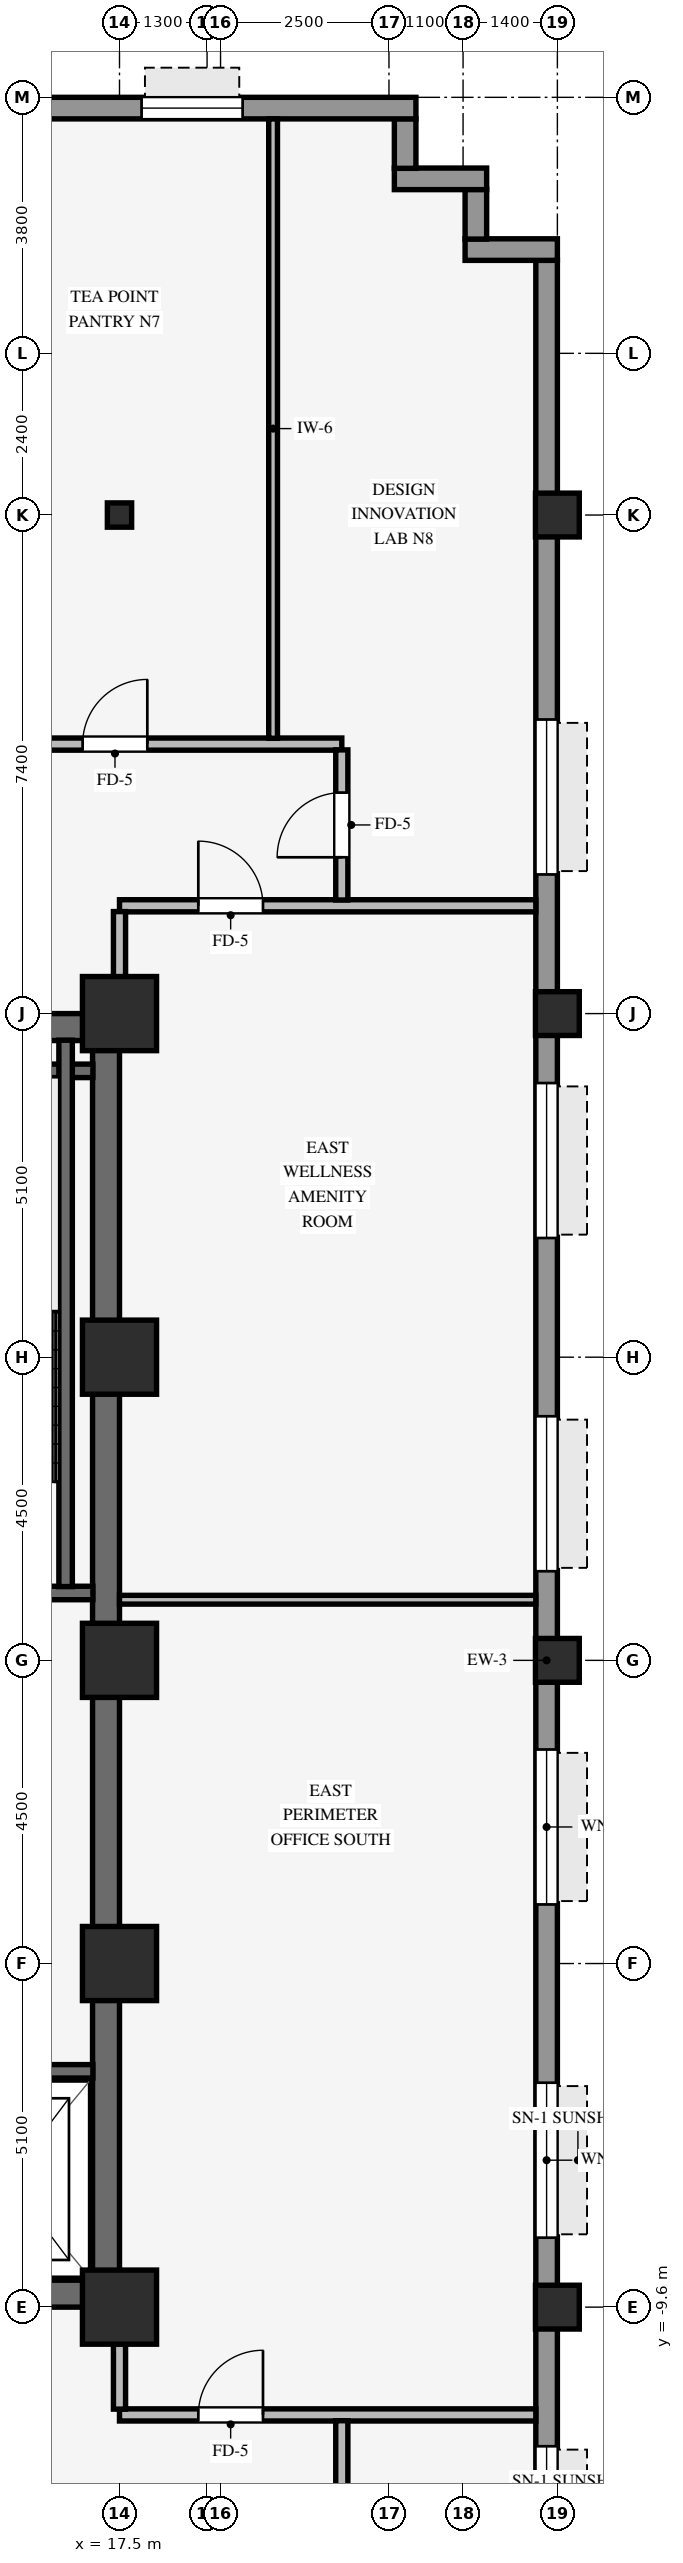
"""IFC4 building model, lengths in metres.
Left out: names, types, materials, properties, quantities, classifications, styles, units other than length and angle.
Written with IfcOpenShell. Run it as: python <this file> out.ifc"""

import sys

from ifc_helpers import new_model, si_unit, direction, frame, frame_2d, origin, origin_2d, place, context, subcontext, project, spatial, rectangle, hollow_rectangle, i_section, extrude, source, transform, mapped, element, fill, save


model = new_model("IFC4")
c1 = context("Model", 3, precision=1e-05, world=origin(), true_north=direction((0.0, 1.0)))
c2 = subcontext(c1, "Body", "Model", "MODEL_VIEW")
j1 = project(units=[si_unit("LENGTHUNIT", "METRE"), si_unit("PLANEANGLEUNIT", "RADIAN")], contexts=[c1])
p1 = place(None, origin())
s1 = spatial("IfcSite", under=j1, at=p1, CompositionType="ELEMENT")
p2 = place(p1, origin())
s2 = spatial("IfcBuilding", under=s1, at=p2, CompositionType="ELEMENT")
p3 = place(p2, frame((0.0, 0.0, 109.25)))
s3 = spatial("IfcBuildingStorey", under=s2, at=p3, CompositionType="ELEMENT", Elevation=109.25)
for number, where, z_axis, x_axis in (
    (1, (9.0, -9.4, 0.0), (0.0, 0.0, 1.0), (1.0, 0.0, 0.0)),
    (2, (9.0, 9.4, 0.0), (0.0, 0.0, 1.0), (1.0, 0.0, 0.0)),
):
    element("IfcWall", number, at=place(p3, frame(where, z_axis=z_axis, x_axis=x_axis)), inside=s3, PredefinedType="SHEAR", context=c2, shape_type="SweptSolid", body=[
        extrude(rectangle(XDim=8.5, YDim=0.4, at=frame_2d((4.25, 0.0))), origin(), (0.0, 0.0, 1.0), 3.37),
    ])
p4 = place(p3, frame((17.3, -9.205, 0.0), z_axis=(0.0, 0.0, 1.0), x_axis=(0.0, 1.0, 0.0)))
e3 = element("IfcWall", 3, at=p4, inside=s3, PredefinedType="SHEAR", context=c2, shape_type="SweptSolid", body=[
    extrude(rectangle(XDim=18.41, YDim=0.4, at=frame_2d((9.205, 0.0))), origin(), (0.0, 0.0, 1.0), 3.37),
])
for number, where, z_axis, x_axis in (
    (4, (17.5, -9.6, 0.0), (0.0, 0.0, 1.0), (1.0, 0.0, 0.0)),
    (5, (17.5, -4.5, 0.0), (0.0, 0.0, 1.0), (1.0, 0.0, 0.0)),
    (6, (17.5, 4.5, 0.0), (0.0, 0.0, 1.0), (1.0, 0.0, 0.0)),
    (7, (17.5, 9.6, 0.0), (0.0, 0.0, 1.0), (1.0, 0.0, 0.0)),
    (8, (17.5, 0.0, 0.0), (0.0, 0.0, 1.0), (1.0, 0.0, 0.0)),
):
    element("IfcColumn", number, at=place(p3, frame(where, z_axis=z_axis, x_axis=x_axis)), inside=s3, PredefinedType="COLUMN", context=c2, shape_type="SweptSolid", body=[
        extrude(rectangle(XDim=1.1, YDim=1.1, at=origin_2d()), origin(), (0.0, 0.0, 1.0), 3.37),
    ])
for number, where, z_axis, x_axis in (
    (9, (24.0, -9.6, 0.0), (0.0, 0.0, 1.0), (1.0, 0.0, 0.0)),
    (10, (24.0, 0.0, 0.0), (0.0, 0.0, 1.0), (1.0, 0.0, 0.0)),
    (11, (24.0, 9.6, 0.0), (0.0, 0.0, 1.0), (1.0, 0.0, 0.0)),
    (12, (24.0, 17.0, 0.0), (0.0, 0.0, 1.0), (1.0, 0.0, 0.0)),
):
    element("IfcColumn", number, at=place(p3, frame(where, z_axis=z_axis, x_axis=x_axis)), inside=s3, PredefinedType="COLUMN", context=c2, shape_type="SweptSolid", body=[
        extrude(hollow_rectangle(XDim=0.65, YDim=0.65, WallThickness=0.04, InnerFilletRadius=0.04, OuterFilletRadius=0.08, at=origin_2d()), origin(), (0.0, 0.0, 1.0), 3.37),
    ])
p5 = place(p3, frame((17.5, 17.0, 0.0), z_axis=(0.0, 0.0, 1.0), x_axis=(1.0, 0.0, 0.0)))
e13 = element("IfcColumn", 13, at=p5, inside=s3, PredefinedType="COLUMN", context=c2, shape_type="SweptSolid", body=[
    extrude(i_section(OverallWidth=0.36, OverallDepth=0.36, WebThickness=0.021, FlangeThickness=0.021, FilletRadius=0.018, at=origin_2d()), origin(), (0.0, 0.0, 1.0), 3.37),
])
p6 = place(p3, frame((23.84, -20.784, 0.0), z_axis=(0.0, 0.0, 1.0), x_axis=(0.0, 1.0, 0.0)))
e14 = element("IfcWall", 14, at=p6, inside=s3, PredefinedType="STANDARD", context=c2, shape_type="SweptSolid", body=[
    extrude(rectangle(XDim=41.568, YDim=0.32, at=frame_2d((20.784, 0.0))), origin(), (0.0, 0.0, 1.0), 2.705),
])
p7 = place(p6, frame((6.819, 0.0, 0.8)))
e15 = element("IfcOpeningElement", 15, at=p7, cuts=e14, PredefinedType="OPENING", context=c2, shape_type="SweptSolid", body=[
    extrude(rectangle(XDim=2.3, YDim=1.62, at=frame_2d((1.15, 0.81))), frame((0.0, 0.17, 0.0), z_axis=(0.0, -1.0, 0.0), x_axis=(1.0, 0.0, 0.0)), (0.0, 0.0, 1.0), 0.34),
])
p8 = place(p6, frame((12.215, 0.0, 0.8)))
e16 = element("IfcOpeningElement", 16, at=p8, cuts=e14, PredefinedType="OPENING", context=c2, shape_type="SweptSolid", body=[
    extrude(rectangle(XDim=2.3, YDim=1.62, at=frame_2d((1.15, 0.81))), frame((0.0, 0.17, 0.0), z_axis=(0.0, -1.0, 0.0), x_axis=(1.0, 0.0, 0.0)), (0.0, 0.0, 1.0), 0.34),
])
p9 = place(p6, frame((17.161, 0.0, 0.8)))
e17 = element("IfcOpeningElement", 17, at=p9, cuts=e14, PredefinedType="OPENING", context=c2, shape_type="SweptSolid", body=[
    extrude(rectangle(XDim=2.3, YDim=1.62, at=frame_2d((1.15, 0.81))), frame((0.0, 0.17, 0.0), z_axis=(0.0, -1.0, 0.0), x_axis=(1.0, 0.0, 0.0)), (0.0, 0.0, 1.0), 0.34),
])
p10 = place(p6, frame((22.107, 0.0, 0.8)))
e18 = element("IfcOpeningElement", 18, at=p10, cuts=e14, PredefinedType="OPENING", context=c2, shape_type="SweptSolid", body=[
    extrude(rectangle(XDim=2.3, YDim=1.62, at=frame_2d((1.15, 0.81))), frame((0.0, 0.17, 0.0), z_axis=(0.0, -1.0, 0.0), x_axis=(1.0, 0.0, 0.0)), (0.0, 0.0, 1.0), 0.34),
])
p11 = place(p6, frame((27.053, 0.0, 0.8)))
e19 = element("IfcOpeningElement", 19, at=p11, cuts=e14, PredefinedType="OPENING", context=c2, shape_type="SweptSolid", body=[
    extrude(rectangle(XDim=2.3, YDim=1.62, at=frame_2d((1.15, 0.81))), frame((0.0, 0.17, 0.0), z_axis=(0.0, -1.0, 0.0), x_axis=(1.0, 0.0, 0.0)), (0.0, 0.0, 1.0), 0.34),
])
p12 = place(p6, frame((32.449, 0.0, 0.8)))
e20 = element("IfcOpeningElement", 20, at=p12, cuts=e14, PredefinedType="OPENING", context=c2, shape_type="SweptSolid", body=[
    extrude(rectangle(XDim=2.3, YDim=1.62, at=frame_2d((1.15, 0.81))), frame((0.0, 0.17, 0.0), z_axis=(0.0, -1.0, 0.0), x_axis=(1.0, 0.0, 0.0)), (0.0, 0.0, 1.0), 0.34),
])
p13 = place(p3, frame((22.63, 20.94, 0.0), z_axis=(0.0, 0.0, 1.0), x_axis=(1.0, 0.0, 0.0)))
e21 = element("IfcWall", 21, at=p13, inside=s3, PredefinedType="STANDARD", context=c2, shape_type="SweptSolid", body=[
    extrude(rectangle(XDim=1.37, YDim=0.32, at=frame_2d((0.685, 0.0))), origin(), (0.0, 0.0, 1.0), 3.36),
])
p14 = place(p3, frame((22.79, 21.096, 0.0), z_axis=(0.0, 0.0, 1.0), x_axis=(0.0, 1.0, 0.0)))
e22 = element("IfcWall", 22, at=p14, inside=s3, PredefinedType="STANDARD", context=c2, shape_type="SweptSolid", body=[
    extrude(rectangle(XDim=0.738, YDim=0.32, at=frame_2d((0.369, 0.0))), origin(), (0.0, 0.0, 1.0), 3.36),
])
p15 = place(p3, frame((21.58, 21.99, 0.0), z_axis=(0.0, 0.0, 1.0), x_axis=(1.0, 0.0, 0.0)))
e23 = element("IfcWall", 23, at=p15, inside=s3, PredefinedType="STANDARD", context=c2, shape_type="SweptSolid", body=[
    extrude(rectangle(XDim=1.37, YDim=0.32, at=frame_2d((0.685, 0.0))), origin(), (0.0, 0.0, 1.0), 3.36),
])
p16 = place(p3, frame((21.74, 22.146, 0.0), z_axis=(0.0, 0.0, 1.0), x_axis=(0.0, 1.0, 0.0)))
e24 = element("IfcWall", 24, at=p16, inside=s3, PredefinedType="STANDARD", context=c2, shape_type="SweptSolid", body=[
    extrude(rectangle(XDim=0.738, YDim=0.32, at=frame_2d((0.369, 0.0))), origin(), (0.0, 0.0, 1.0), 3.36),
])
p17 = place(p3, frame((-21.9, 23.04, 0.0), z_axis=(0.0, 0.0, 1.0), x_axis=(1.0, 0.0, 0.0)))
e25 = element("IfcWall", 25, at=p17, inside=s3, PredefinedType="STANDARD", context=c2, shape_type="SweptSolid", body=[
    extrude(rectangle(XDim=43.8, YDim=0.32, at=frame_2d((21.9, 0.0))), origin(), (0.0, 0.0, 1.0), 2.705),
])
p18 = place(p17, frame((2.572, 0.0, 0.8)))
e26 = element("IfcOpeningElement", 26, at=p18, cuts=e25, PredefinedType="OPENING", context=c2, shape_type="SweptSolid", body=[
    extrude(rectangle(XDim=1.5, YDim=1.6, at=frame_2d((0.75, 0.8))), frame((0.0, 0.17, 0.0), z_axis=(0.0, -1.0, 0.0), x_axis=(1.0, 0.0, 0.0)), (0.0, 0.0, 1.0), 0.34),
])
p19 = place(p17, frame((6.317, 0.0, 0.8)))
e27 = element("IfcOpeningElement", 27, at=p19, cuts=e25, PredefinedType="OPENING", context=c2, shape_type="SweptSolid", body=[
    extrude(rectangle(XDim=1.5, YDim=1.6, at=frame_2d((0.75, 0.8))), frame((0.0, 0.17, 0.0), z_axis=(0.0, -1.0, 0.0), x_axis=(1.0, 0.0, 0.0)), (0.0, 0.0, 1.0), 0.34),
])
p20 = place(p17, frame((10.511, 0.0, 0.8)))
e28 = element("IfcOpeningElement", 28, at=p20, cuts=e25, PredefinedType="OPENING", context=c2, shape_type="SweptSolid", body=[
    extrude(rectangle(XDim=1.5, YDim=1.6, at=frame_2d((0.75, 0.8))), frame((0.0, 0.17, 0.0), z_axis=(0.0, -1.0, 0.0), x_axis=(1.0, 0.0, 0.0)), (0.0, 0.0, 1.0), 0.34),
])
p21 = place(p17, frame((16.956, 0.0, 0.8)))
e29 = element("IfcOpeningElement", 29, at=p21, cuts=e25, PredefinedType="OPENING", context=c2, shape_type="SweptSolid", body=[
    extrude(rectangle(XDim=1.5, YDim=1.6, at=frame_2d((0.75, 0.8))), frame((0.0, 0.17, 0.0), z_axis=(0.0, -1.0, 0.0), x_axis=(1.0, 0.0, 0.0)), (0.0, 0.0, 1.0), 0.34),
])
p22 = place(p17, frame((24.894, 0.0, 0.8)))
e30 = element("IfcOpeningElement", 30, at=p22, cuts=e25, PredefinedType="OPENING", context=c2, shape_type="SweptSolid", body=[
    extrude(rectangle(XDim=1.5, YDim=1.6, at=frame_2d((0.75, 0.8))), frame((0.0, 0.17, 0.0), z_axis=(0.0, -1.0, 0.0), x_axis=(1.0, 0.0, 0.0)), (0.0, 0.0, 1.0), 0.34),
])
p23 = place(p17, frame((35.083, 0.0, 0.8)))
e31 = element("IfcOpeningElement", 31, at=p23, cuts=e25, PredefinedType="OPENING", context=c2, shape_type="SweptSolid", body=[
    extrude(rectangle(XDim=1.5, YDim=1.6, at=frame_2d((0.75, 0.8))), frame((0.0, 0.17, 0.0), z_axis=(0.0, -1.0, 0.0), x_axis=(1.0, 0.0, 0.0)), (0.0, 0.0, 1.0), 0.34),
])
p24 = place(p17, frame((39.728, 0.0, 0.8)))
e32 = element("IfcOpeningElement", 32, at=p24, cuts=e25, PredefinedType="OPENING", context=c2, shape_type="SweptSolid", body=[
    extrude(rectangle(XDim=1.5, YDim=1.6, at=frame_2d((0.75, 0.8))), frame((0.0, 0.17, 0.0), z_axis=(0.0, -1.0, 0.0), x_axis=(1.0, 0.0, 0.0)), (0.0, 0.0, 1.0), 0.34),
])
for number, where, z_axis, x_axis in (
    (33, (13.535, 1.0, 0.0), (0.0, 0.0, 1.0), (1.0, 0.0, 0.0)),
    (34, (13.535, 8.75, 0.0), (0.0, 0.0, 1.0), (1.0, 0.0, 0.0)),
):
    element("IfcWall", number, at=place(p3, frame(where, z_axis=z_axis, x_axis=x_axis)), inside=s3, PredefinedType="SHEAR", context=c2, shape_type="SweptSolid", body=[
        extrude(rectangle(XDim=3.57, YDim=0.2, at=frame_2d((1.785, 0.0))), origin(), (0.0, 0.0, 1.0), 3.37),
    ])
p25 = place(p3, frame((16.7, 1.095, 0.0), z_axis=(0.0, 0.0, 1.0), x_axis=(0.0, 1.0, 0.0)))
e35 = element("IfcWall", 35, at=p25, inside=s3, PredefinedType="SHEAR", context=c2, shape_type="SweptSolid", body=[
    extrude(rectangle(XDim=8.11, YDim=0.2, at=frame_2d((4.055, 0.0))), origin(), (0.0, 0.0, 1.0), 3.37),
])
p26 = place(p3, frame((14.645, -6.1, 0.0), z_axis=(0.0, 0.0, 1.0), x_axis=(1.0, 0.0, 0.0)))
e36 = element("IfcWall", 36, at=p26, inside=s3, PredefinedType="SHEAR", context=c2, shape_type="SweptSolid", body=[
    extrude(rectangle(XDim=2.46, YDim=0.2, at=frame_2d((1.23, 0.0))), origin(), (0.0, 0.0, 1.0), 3.37),
])
p27 = place(p3, frame((17.5, -11.2, 0.0), z_axis=(0.0, 0.0, 1.0), x_axis=(1.0, 0.0, 0.0)))
e37 = element("IfcWall", 37, at=p27, inside=s3, PredefinedType="PARTITIONING", context=c2, shape_type="SweptSolid", body=[
    extrude(rectangle(XDim=6.18, YDim=0.18, at=frame_2d((3.09, 0.0))), origin(), (0.0, 0.0, 1.0), 3.36),
])
p28 = place(p27, frame((1.17, 0.0, 0.0)))
e38 = element("IfcOpeningElement", 38, at=p28, cuts=e37, PredefinedType="OPENING", context=c2, shape_type="SweptSolid", body=[
    extrude(rectangle(XDim=0.96, YDim=2.1, at=frame_2d((0.48, 1.05))), frame((0.0, 0.1, 0.0), z_axis=(0.0, -1.0, 0.0), x_axis=(1.0, 0.0, 0.0)), (0.0, 0.0, 1.0), 0.2),
])
p29 = place(p3, frame((17.5, 0.9, 0.0), z_axis=(0.0, 0.0, 1.0), x_axis=(1.0, 0.0, 0.0)))
e39 = element("IfcWall", 39, at=p29, inside=s3, PredefinedType="PARTITIONING", context=c2, shape_type="SweptSolid", body=[
    extrude(rectangle(XDim=6.18, YDim=0.13, at=frame_2d((3.09, 0.0))), origin(), (0.0, 0.0, 1.0), 3.36),
])
p30 = place(p3, frame((17.5, 11.2, 0.0), z_axis=(0.0, 0.0, 1.0), x_axis=(1.0, 0.0, 0.0)))
e40 = element("IfcWall", 40, at=p30, inside=s3, PredefinedType="PARTITIONING", context=c2, shape_type="SweptSolid", body=[
    extrude(rectangle(XDim=6.18, YDim=0.18, at=frame_2d((3.09, 0.0))), origin(), (0.0, 0.0, 1.0), 3.36),
])
p31 = place(p30, frame((1.17, 0.0, 0.0)))
e41 = element("IfcOpeningElement", 41, at=p31, cuts=e40, PredefinedType="OPENING", context=c2, shape_type="SweptSolid", body=[
    extrude(rectangle(XDim=0.96, YDim=2.1, at=frame_2d((0.48, 1.05))), frame((0.0, 0.1, 0.0), z_axis=(0.0, -1.0, 0.0), x_axis=(1.0, 0.0, 0.0)), (0.0, 0.0, 1.0), 0.2),
])
p32 = place(p3, frame((15.086, 13.6, 0.0), z_axis=(0.0, 0.0, 1.0), x_axis=(1.0, 0.0, 0.0)))
e42 = element("IfcWall", 42, at=p32, inside=s3, PredefinedType="PARTITIONING", context=c2, shape_type="SweptSolid", body=[
    extrude(rectangle(XDim=5.714, YDim=0.18, at=frame_2d((2.857, 0.0))), origin(), (0.0, 0.0, 1.0), 2.998),
])
p33 = place(p32, frame((1.867, 0.0, 0.0)))
e43 = element("IfcOpeningElement", 43, at=p33, cuts=e42, PredefinedType="OPENING", context=c2, shape_type="SweptSolid", body=[
    extrude(rectangle(XDim=0.96, YDim=2.1, at=frame_2d((0.48, 1.05))), frame((0.0, 0.1, 0.0), z_axis=(0.0, -1.0, 0.0), x_axis=(1.0, 0.0, 0.0)), (0.0, 0.0, 1.0), 0.2),
])
for number, where, z_axis, x_axis in (
    (44, (17.5, -11.114, 0.0), (0.0, 0.0, 1.0), (0.0, 1.0, 0.0)),
    (45, (17.5, 10.146, 0.0), (0.0, 0.0, 1.0), (0.0, 1.0, 0.0)),
):
    element("IfcWall", number, at=place(p3, frame(where, z_axis=z_axis, x_axis=x_axis)), inside=s3, PredefinedType="PARTITIONING", context=c2, shape_type="SweptSolid", body=[
        extrude(rectangle(XDim=0.968, YDim=0.18, at=frame_2d((0.484, 0.0))), origin(), (0.0, 0.0, 1.0), 2.738),
    ])
p34 = place(p3, frame((19.78, 13.686, 0.0), z_axis=(0.0, 0.0, 1.0), x_axis=(0.0, 1.0, 0.0)))
e46 = element("IfcWall", 46, at=p34, inside=s3, PredefinedType="PARTITIONING", context=c2, shape_type="SweptSolid", body=[
    extrude(rectangle(XDim=9.194, YDim=0.13, at=frame_2d((4.597, 0.0))), origin(), (0.0, 0.0, 1.0), 3.36),
])
p35 = place(p3, frame((20.8, -13.514, 0.0), z_axis=(0.0, 0.0, 1.0), x_axis=(0.0, 1.0, 0.0)))
e47 = element("IfcWall", 47, at=p35, inside=s3, PredefinedType="PARTITIONING", context=c2, shape_type="SweptSolid", body=[
    extrude(rectangle(XDim=2.228, YDim=0.18, at=frame_2d((1.114, 0.0))), origin(), (0.0, 0.0, 1.0), 3.36),
])
p36 = place(p3, frame((20.8, 11.286, 0.0), z_axis=(0.0, 0.0, 1.0), x_axis=(0.0, 1.0, 0.0)))
e48 = element("IfcWall", 48, at=p36, inside=s3, PredefinedType="PARTITIONING", context=c2, shape_type="SweptSolid", body=[
    extrude(rectangle(XDim=2.228, YDim=0.18, at=frame_2d((1.114, 0.0))), origin(), (0.0, 0.0, 1.0), 3.36),
])
p37 = place(p36, frame((0.634, 0.0, 0.0)))
e49 = element("IfcOpeningElement", 49, at=p37, cuts=e48, PredefinedType="OPENING", context=c2, shape_type="SweptSolid", body=[
    extrude(rectangle(XDim=0.96, YDim=2.1, at=frame_2d((0.48, 1.05))), frame((0.0, 0.1, 0.0), z_axis=(0.0, -1.0, 0.0), x_axis=(1.0, 0.0, 0.0)), (0.0, 0.0, 1.0), 0.2),
])
m1 = source(origin(), c2, "Body", "SweptSolid", [
    extrude(rectangle(XDim=2.3, YDim=1.62, at=frame_2d((1.15, 0.81))), frame((0.0, 0.03, 0.0), z_axis=(0.0, -1.0, 0.0), x_axis=(1.0, 0.0, 0.0)), (0.0, 0.0, 1.0), 0.06),
])
p38 = place(p7, origin())
e50 = element("IfcWindow", 50, at=p38, inside=s3, PartitioningType="SINGLE_PANEL", PredefinedType="WINDOW", context=c2, shape_type="MappedRepresentation", body=[
    mapped(m1, transform((0.0, 0.0, 0.0), scale=1.0)),
])
fill(e15, e50)
p39 = place(p8, origin())
e51 = element("IfcWindow", 51, at=p39, inside=s3, PartitioningType="SINGLE_PANEL", PredefinedType="WINDOW", context=c2, shape_type="MappedRepresentation", body=[
    mapped(m1, transform((0.0, 0.0, 0.0), scale=1.0)),
])
fill(e16, e51)
p40 = place(p9, origin())
e52 = element("IfcWindow", 52, at=p40, inside=s3, PartitioningType="SINGLE_PANEL", PredefinedType="WINDOW", context=c2, shape_type="MappedRepresentation", body=[
    mapped(m1, transform((0.0, 0.0, 0.0), scale=1.0)),
])
fill(e17, e52)
p41 = place(p10, origin())
e53 = element("IfcWindow", 53, at=p41, inside=s3, PartitioningType="SINGLE_PANEL", PredefinedType="WINDOW", context=c2, shape_type="MappedRepresentation", body=[
    mapped(m1, transform((0.0, 0.0, 0.0), scale=1.0)),
])
fill(e18, e53)
p42 = place(p11, origin())
e54 = element("IfcWindow", 54, at=p42, inside=s3, PartitioningType="SINGLE_PANEL", PredefinedType="WINDOW", context=c2, shape_type="MappedRepresentation", body=[
    mapped(m1, transform((0.0, 0.0, 0.0), scale=1.0)),
])
fill(e19, e54)
p43 = place(p12, origin())
e55 = element("IfcWindow", 55, at=p43, inside=s3, PartitioningType="SINGLE_PANEL", PredefinedType="WINDOW", context=c2, shape_type="MappedRepresentation", body=[
    mapped(m1, transform((0.0, 0.0, 0.0), scale=1.0)),
])
fill(e20, e55)
m2 = source(origin(), c2, "Body", "SweptSolid", [
    extrude(rectangle(XDim=1.5, YDim=1.6, at=frame_2d((0.75, 0.8))), frame((0.0, 0.03, 0.0), z_axis=(0.0, -1.0, 0.0), x_axis=(1.0, 0.0, 0.0)), (0.0, 0.0, 1.0), 0.06),
])
p44 = place(p24, origin())
e56 = element("IfcWindow", 56, at=p44, inside=s3, PartitioningType="SINGLE_PANEL", PredefinedType="WINDOW", context=c2, shape_type="MappedRepresentation", body=[
    mapped(m2, transform((0.0, 0.0, 0.0), scale=1.0)),
])
fill(e32, e56)
m3 = source(origin(), c2, "Body", "SweptSolid", [
    extrude(rectangle(XDim=0.96, YDim=2.1, at=frame_2d((0.48, 1.05))), frame((0.0, 0.025, 0.0), z_axis=(0.0, -1.0, 0.0), x_axis=(1.0, 0.0, 0.0)), (0.0, 0.0, 1.0), 0.05),
])
p45 = place(p33, origin())
e57 = element("IfcDoor", 57, at=p45, inside=s3, OperationType="SINGLE_SWING_RIGHT", PredefinedType="DOOR", context=c2, shape_type="MappedRepresentation", body=[
    mapped(m3, transform((0.0, 0.0, 0.0), scale=1.0)),
])
fill(e43, e57)
p46 = place(p28, origin())
e58 = element("IfcDoor", 58, at=p46, inside=s3, OperationType="SINGLE_SWING_RIGHT", PredefinedType="DOOR", context=c2, shape_type="MappedRepresentation", body=[
    mapped(m3, transform((0.0, 0.0, 0.0), scale=1.0)),
])
fill(e38, e58)
p47 = place(p31, origin())
e59 = element("IfcDoor", 59, at=p47, inside=s3, OperationType="SINGLE_SWING_LEFT", PredefinedType="DOOR", context=c2, shape_type="MappedRepresentation", body=[
    mapped(m3, transform((0.0, 0.0, 0.0), scale=1.0)),
])
fill(e41, e59)
p48 = place(p37, origin())
e60 = element("IfcDoor", 60, at=p48, inside=s3, OperationType="SINGLE_SWING_LEFT", PredefinedType="DOOR", context=c2, shape_type="MappedRepresentation", body=[
    mapped(m3, transform((0.0, 0.0, 0.0), scale=1.0)),
])
fill(e49, e60)
save(model, sys.argv[1])
